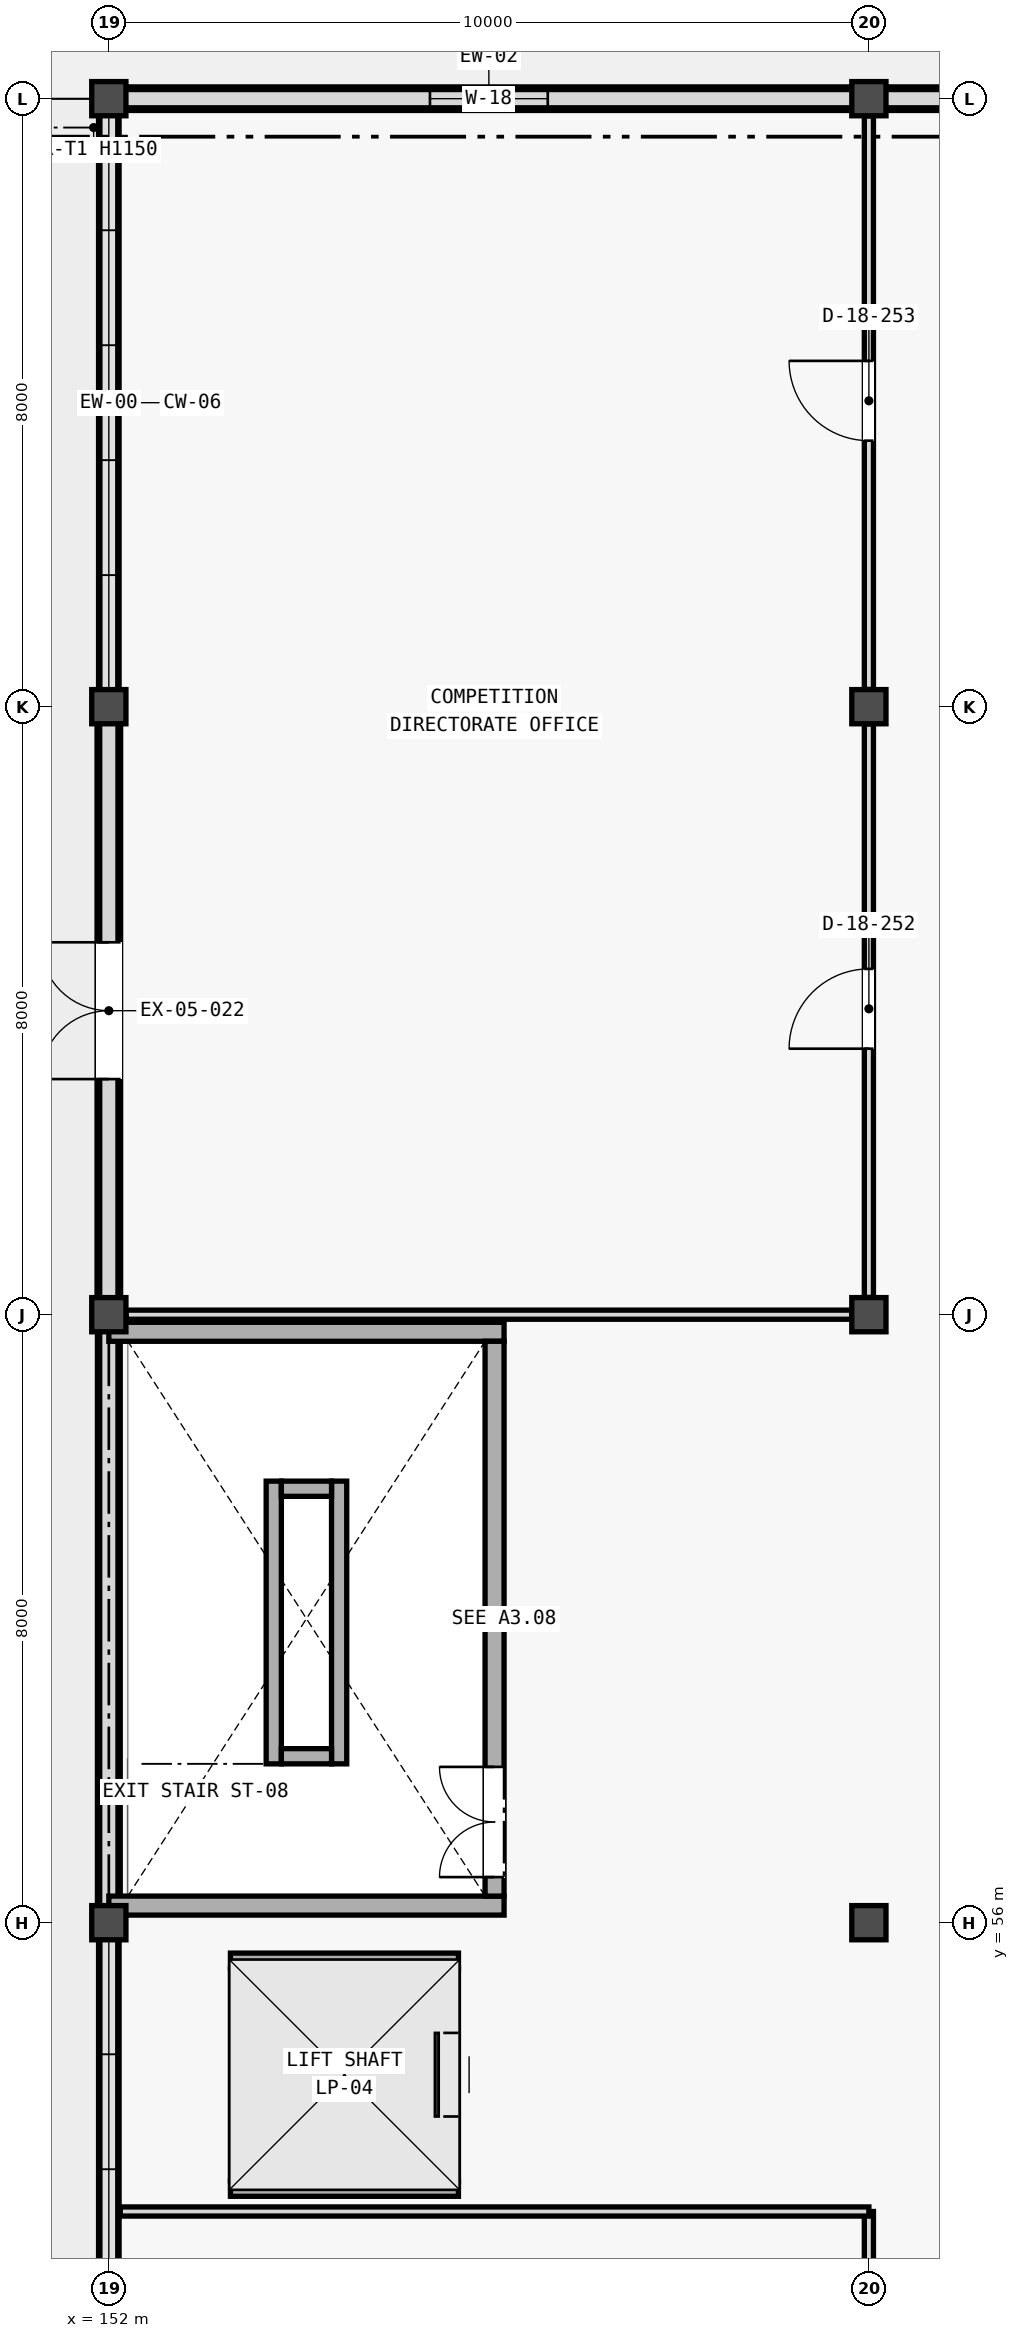
"""IFC4 building model, lengths in metres.
Left out: names, types, materials, properties, quantities, classifications, styles, units other than length and angle.
Written with IfcOpenShell. Run it as: python <this file> out.ifc"""

import sys

from ifc_helpers import new_model, si_unit, direction, frame, frame_2d, origin, origin_2d, place, context, subcontext, project, spatial, rectangle, extrude, element, fill, save


model = new_model("IFC4")
c1 = context("Model", 3, precision=1e-05, world=origin(), true_north=direction((0.0, 1.0)))
c2 = subcontext(c1, "Body", "Model", "MODEL_VIEW")
j1 = project(units=[si_unit("LENGTHUNIT", "METRE"), si_unit("PLANEANGLEUNIT", "RADIAN")], contexts=[c1])
p1 = place(None, origin())
s1 = spatial("IfcSite", under=j1, at=p1, CompositionType="ELEMENT")
p2 = place(p1, origin())
s2 = spatial("IfcBuilding", under=s1, at=p2, CompositionType="ELEMENT")
p3 = place(p2, frame((0.0, 0.0, 18.6)))
s3 = spatial("IfcBuildingStorey", under=s2, at=p3, CompositionType="ELEMENT", Elevation=18.6)
for number, where, z_axis, x_axis in (
    (1, (152.0, 56.0, 0.0), (0.0, 0.0, 1.0), (1.0, 0.0, 0.0)),
    (2, (162.0, 56.0, 0.0), (0.0, 0.0, 1.0), (1.0, 0.0, 0.0)),
    (3, (152.0, 64.0, 0.0), (0.0, 0.0, 1.0), (1.0, 0.0, 0.0)),
    (4, (162.0, 64.0, 0.0), (0.0, 0.0, 1.0), (1.0, 0.0, 0.0)),
    (5, (152.0, 72.0, 0.0), (0.0, 0.0, 1.0), (1.0, 0.0, 0.0)),
    (6, (162.0, 72.0, 0.0), (0.0, 0.0, 1.0), (1.0, 0.0, 0.0)),
    (7, (152.0, 80.0, 0.0), (0.0, 0.0, 1.0), (1.0, 0.0, 0.0)),
    (8, (162.0, 80.0, 0.0), (0.0, 0.0, 1.0), (1.0, 0.0, 0.0)),
):
    element("IfcColumn", number, at=place(p3, frame(where, z_axis=z_axis, x_axis=x_axis)), inside=s3, PredefinedType="COLUMN", context=c2, shape_type="SweptSolid", body=[
        extrude(rectangle(XDim=0.45, YDim=0.45, at=origin_2d()), origin(), (0.0, 0.0, 1.0), 3.985),
    ])
p4 = place(p3, frame((152.0, 48.221, 0.0), z_axis=(0.0, 0.0, 1.0), x_axis=(0.0, 1.0, 0.0)))
e9 = element("IfcWall", 9, at=p4, inside=s3, PredefinedType="STANDARD", context=c2, shape_type="SweptSolid", body=[
    extrude(rectangle(XDim=7.558, YDim=0.27, at=frame_2d((3.779, 0.0))), origin(), (0.0, 0.0, 1.0), 0.8),
])
p5 = place(p3, frame((152.0, 56.221, 0.0), z_axis=(0.0, 0.0, 1.0), x_axis=(0.0, 1.0, 0.0)))
e10 = element("IfcWall", 10, at=p5, inside=s3, PredefinedType="SHEAR", context=c2, shape_type="SweptSolid", body=[
    extrude(rectangle(XDim=7.558, YDim=0.3, at=frame_2d((3.779, 0.0))), origin(), (0.0, 0.0, 1.0), 3.985),
])
p6 = place(p3, frame((152.0, 64.221, 0.0), z_axis=(0.0, 0.0, 1.0), x_axis=(0.0, 1.0, 0.0)))
e11 = element("IfcWall", 11, at=p6, inside=s3, PredefinedType="STANDARD", context=c2, shape_type="SweptSolid", body=[
    extrude(rectangle(XDim=7.558, YDim=0.31, at=frame_2d((3.779, 0.0))), origin(), (0.0, 0.0, 1.0), 3.365),
])
p7 = place(p6, frame((2.879, 0.0, 0.0)))
e12 = element("IfcOpeningElement", 12, at=p7, cuts=e11, PredefinedType="OPENING", context=c2, shape_type="SweptSolid", body=[
    extrude(rectangle(XDim=1.8, YDim=2.3, at=frame_2d((0.9, 1.15))), frame((0.0, 0.165, 0.0), z_axis=(0.0, -1.0, 0.0), x_axis=(1.0, 0.0, 0.0)), (0.0, 0.0, 1.0), 0.33),
])
p8 = place(p3, frame((152.0, 72.221, 0.0), z_axis=(0.0, 0.0, 1.0), x_axis=(0.0, 1.0, 0.0)))
e13 = element("IfcWall", 13, at=p8, inside=s3, PredefinedType="STANDARD", context=c2, shape_type="SweptSolid", body=[
    extrude(rectangle(XDim=7.558, YDim=0.27, at=frame_2d((3.779, 0.0))), origin(), (0.0, 0.0, 1.0), 0.8),
])
p9 = place(p3, frame((152.221, 80.0, 0.0), z_axis=(0.0, 0.0, 1.0), x_axis=(1.0, 0.0, 0.0)))
e14 = element("IfcWall", 14, at=p9, inside=s3, PredefinedType="STANDARD", context=c2, shape_type="SweptSolid", body=[
    extrude(rectangle(XDim=9.558, YDim=0.31, at=frame_2d((4.779, 0.0))), origin(), (0.0, 0.0, 1.0), 3.4),
])
p10 = place(p9, frame((4.004, 0.0, 0.95)))
e15 = element("IfcOpeningElement", 15, at=p10, cuts=e14, PredefinedType="OPENING", context=c2, shape_type="SweptSolid", body=[
    extrude(rectangle(XDim=1.55, YDim=1.95, at=frame_2d((0.775, 0.975))), frame((0.0, 0.165, 0.0), z_axis=(0.0, -1.0, 0.0), x_axis=(1.0, 0.0, 0.0)), (0.0, 0.0, 1.0), 0.33),
])
p11 = place(p3, frame((162.221, 80.0, 0.0), z_axis=(0.0, 0.0, 1.0), x_axis=(1.0, 0.0, 0.0)))
e16 = element("IfcWall", 16, at=p11, inside=s3, PredefinedType="STANDARD", context=c2, shape_type="SweptSolid", body=[
    extrude(rectangle(XDim=11.558, YDim=0.31, at=frame_2d((5.779, 0.0))), origin(), (0.0, 0.0, 1.0), 3.4),
])
p12 = place(p11, frame((4.954, 0.0, 0.95)))
e17 = element("IfcOpeningElement", 17, at=p12, cuts=e16, PredefinedType="OPENING", context=c2, shape_type="SweptSolid", body=[
    extrude(rectangle(XDim=1.65, YDim=1.7, at=frame_2d((0.825, 0.85))), frame((0.0, 0.165, 0.0), z_axis=(0.0, -1.0, 0.0), x_axis=(1.0, 0.0, 0.0)), (0.0, 0.0, 1.0), 0.33),
])
p13 = place(p3, frame((152.0, 80.0, 4.2), z_axis=(0.0, 0.0, 1.0), x_axis=(1.0, 0.0, 0.0)))
e18 = element("IfcWall", 18, at=p13, inside=s3, PredefinedType="PARAPET", context=c2, shape_type="SweptSolid", body=[
    extrude(rectangle(XDim=32.0, YDim=0.24, at=frame_2d((16.0, 0.0))), origin(), (0.0, 0.0, 1.0), 1.1),
])
p14 = place(p3, frame((152.0, 24.12, 4.2), z_axis=(0.0, 0.0, 1.0), x_axis=(0.0, 1.0, 0.0)))
e19 = element("IfcWall", 19, at=p14, inside=s3, PredefinedType="PARAPET", context=c2, shape_type="SweptSolid", body=[
    extrude(rectangle(XDim=55.76, YDim=0.24, at=frame_2d((27.88, 0.0))), origin(), (0.0, 0.0, 1.0), 1.1),
])
for number, where, z_axis, x_axis in (
    (20, (152.0, 56.225, 0.0), (0.0, 0.0, 1.0), (1.0, 0.0, 0.0)),
    (21, (152.0, 63.775, 0.0), (0.0, 0.0, 1.0), (1.0, 0.0, 0.0)),
):
    element("IfcWall", number, at=place(p3, frame(where, z_axis=z_axis, x_axis=x_axis)), inside=s3, PredefinedType="SHEAR", context=c2, shape_type="SweptSolid", body=[
        extrude(rectangle(XDim=5.2, YDim=0.25, at=frame_2d((2.6, 0.0))), origin(), (0.0, 0.0, 1.0), 3.985),
    ])
p15 = place(p3, frame((157.075, 56.35, 0.0), z_axis=(0.0, 0.0, 1.0), x_axis=(0.0, 1.0, 0.0)))
e22 = element("IfcWall", 22, at=p15, inside=s3, PredefinedType="SHEAR", context=c2, shape_type="SweptSolid", body=[
    extrude(rectangle(XDim=7.3, YDim=0.25, at=frame_2d((3.65, 0.0))), origin(), (0.0, 0.0, 1.0), 3.985),
])
p16 = place(p15, frame((0.25, 0.0, 0.0)))
e23 = element("IfcOpeningElement", 23, at=p16, cuts=e22, PredefinedType="OPENING", context=c2, shape_type="SweptSolid", body=[
    extrude(rectangle(XDim=1.45, YDim=2.2, at=frame_2d((0.725, 1.1))), frame((0.0, 0.135, 0.0), z_axis=(0.0, -1.0, 0.0), x_axis=(1.0, 0.0, 0.0)), (0.0, 0.0, 1.0), 0.27),
])
for number, where, z_axis, x_axis in (
    (24, (154.17, 58.09, 0.0), (0.0, 0.0, 1.0), (0.0, 1.0, 0.0)),
    (25, (155.03, 58.09, 0.0), (0.0, 0.0, 1.0), (0.0, 1.0, 0.0)),
):
    element("IfcWall", number, at=place(p3, frame(where, z_axis=z_axis, x_axis=x_axis)), inside=s3, PredefinedType="SHEAR", context=c2, shape_type="SweptSolid", body=[
        extrude(rectangle(XDim=3.72, YDim=0.2, at=frame_2d((1.86, 0.0))), origin(), (0.0, 0.0, 1.0), 3.985),
    ])
for number, where, z_axis, x_axis in (
    (26, (154.27, 58.19, 0.0), (0.0, 0.0, 1.0), (1.0, 0.0, 0.0)),
    (27, (154.27, 61.71, 0.0), (0.0, 0.0, 1.0), (1.0, 0.0, 0.0)),
):
    element("IfcWall", number, at=place(p3, frame(where, z_axis=z_axis, x_axis=x_axis)), inside=s3, PredefinedType="SHEAR", context=c2, shape_type="SweptSolid", body=[
        extrude(rectangle(XDim=0.66, YDim=0.2, at=frame_2d((0.33, 0.0))), origin(), (0.0, 0.0, 1.0), 3.985),
    ])
for number, where, z_axis, x_axis in (
    (28, (153.6, 52.5, 0.0), (0.0, 0.0, 1.0), (1.0, 0.0, 0.0)),
    (29, (153.6, 55.5, 0.0), (0.0, 0.0, 1.0), (1.0, 0.0, 0.0)),
):
    element("IfcWall", number, at=place(p3, frame(where, z_axis=z_axis, x_axis=x_axis)), inside=s3, PredefinedType="SHEAR", context=c2, shape_type="SweptSolid", body=[
        extrude(rectangle(XDim=3.0, YDim=0.2, at=frame_2d((1.5, 0.0))), origin(), (0.0, 0.0, 1.0), 3.985),
    ])
p17 = place(p3, frame((153.7, 52.6, 0.0), z_axis=(0.0, 0.0, 1.0), x_axis=(0.0, 1.0, 0.0)))
e30 = element("IfcWall", 30, at=p17, inside=s3, PredefinedType="SHEAR", context=c2, shape_type="SweptSolid", body=[
    extrude(rectangle(XDim=2.8, YDim=0.2, at=frame_2d((1.4, 0.0))), origin(), (0.0, 0.0, 1.0), 3.985),
])
p18 = place(p3, frame((156.5, 52.6, 0.0), z_axis=(0.0, 0.0, 1.0), x_axis=(0.0, 1.0, 0.0)))
e31 = element("IfcWall", 31, at=p18, inside=s3, PredefinedType="SHEAR", context=c2, shape_type="SweptSolid", body=[
    extrude(rectangle(XDim=2.8, YDim=0.2, at=frame_2d((1.4, 0.0))), origin(), (0.0, 0.0, 1.0), 3.985),
])
p19 = place(p18, frame((0.85, 0.0, 0.0)))
e32 = element("IfcOpeningElement", 32, at=p19, cuts=e31, PredefinedType="OPENING", context=c2, shape_type="SweptSolid", body=[
    extrude(rectangle(XDim=1.1, YDim=2.2, at=frame_2d((0.55, 1.1))), frame((0.0, 0.11, 0.0), z_axis=(0.0, -1.0, 0.0), x_axis=(1.0, 0.0, 0.0)), (0.0, 0.0, 1.0), 0.22),
])
p20 = place(p3, frame((162.0, 48.227, 0.0), z_axis=(0.0, 0.0, 1.0), x_axis=(0.0, 1.0, 0.0)))
e33 = element("IfcWall", 33, at=p20, inside=s3, PredefinedType="PARTITIONING", context=c2, shape_type="SweptSolid", body=[
    extrude(rectangle(XDim=3.973, YDim=0.12, at=frame_2d((1.986, 0.0))), origin(), (0.0, 0.0, 1.0), 3.365),
])
p21 = place(p3, frame((162.0, 64.227, 0.0), z_axis=(0.0, 0.0, 1.0), x_axis=(0.0, 1.0, 0.0)))
e34 = element("IfcWall", 34, at=p21, inside=s3, PredefinedType="PARTITIONING", context=c2, shape_type="SweptSolid", body=[
    extrude(rectangle(XDim=7.546, YDim=0.12, at=frame_2d((3.773, 0.0))), origin(), (0.0, 0.0, 1.0), 3.365),
])
p22 = place(p21, frame((3.273, 0.0, 0.0)))
e35 = element("IfcOpeningElement", 35, at=p22, cuts=e34, PredefinedType="OPENING", context=c2, shape_type="SweptSolid", body=[
    extrude(rectangle(XDim=1.05, YDim=2.2, at=frame_2d((0.525, 1.1))), frame((0.0, 0.07, 0.0), z_axis=(0.0, -1.0, 0.0), x_axis=(1.0, 0.0, 0.0)), (0.0, 0.0, 1.0), 0.14),
])
p23 = place(p3, frame((162.0, 72.227, 0.0), z_axis=(0.0, 0.0, 1.0), x_axis=(0.0, 1.0, 0.0)))
e36 = element("IfcWall", 36, at=p23, inside=s3, PredefinedType="PARTITIONING", context=c2, shape_type="SweptSolid", body=[
    extrude(rectangle(XDim=7.546, YDim=0.12, at=frame_2d((3.773, 0.0))), origin(), (0.0, 0.0, 1.0), 3.365),
])
p24 = place(p23, frame((3.273, 0.0, 0.0)))
e37 = element("IfcOpeningElement", 37, at=p24, cuts=e36, PredefinedType="OPENING", context=c2, shape_type="SweptSolid", body=[
    extrude(rectangle(XDim=1.05, YDim=2.2, at=frame_2d((0.525, 1.1))), frame((0.0, 0.07, 0.0), z_axis=(0.0, -1.0, 0.0), x_axis=(1.0, 0.0, 0.0)), (0.0, 0.0, 1.0), 0.14),
])
p25 = place(p3, frame((152.15, 52.2, 0.0), z_axis=(0.0, 0.0, 1.0), x_axis=(1.0, 0.0, 0.0)))
e38 = element("IfcWall", 38, at=p25, inside=s3, PredefinedType="PARTITIONING", context=c2, shape_type="SweptSolid", body=[
    extrude(rectangle(XDim=9.85, YDim=0.12, at=frame_2d((4.925, 0.0))), origin(), (0.0, 0.0, 1.0), 3.365),
])
p26 = place(p3, frame((152.227, 64.0, 0.0), z_axis=(0.0, 0.0, 1.0), x_axis=(1.0, 0.0, 0.0)))
e39 = element("IfcWall", 39, at=p26, inside=s3, PredefinedType="PARTITIONING", context=c2, shape_type="SweptSolid", body=[
    extrude(rectangle(XDim=9.546, YDim=0.12, at=frame_2d((4.773, 0.0))), origin(), (0.0, 0.0, 1.0), 3.515),
])
p27 = place(p7, origin())
e40 = element("IfcDoor", 40, at=p27, inside=s3, OperationType="DOUBLE_DOOR_SINGLE_SWING", PredefinedType="DOOR", context=c2, shape_type="SweptSolid", body=[
    extrude(rectangle(XDim=1.8, YDim=2.3, at=frame_2d((0.9, 1.15))), frame((0.0, 0.025, 0.0), z_axis=(0.0, -1.0, 0.0), x_axis=(1.0, 0.0, 0.0)), (0.0, 0.0, 1.0), 0.05),
])
fill(e12, e40)
p28 = place(p10, origin())
e41 = element("IfcWindow", 41, at=p28, inside=s3, PartitioningType="SINGLE_PANEL", PredefinedType="WINDOW", context=c2, shape_type="SweptSolid", body=[
    extrude(rectangle(XDim=1.55, YDim=1.95, at=frame_2d((0.775, 0.975))), frame((0.0, 0.03, 0.0), z_axis=(0.0, -1.0, 0.0), x_axis=(1.0, 0.0, 0.0)), (0.0, 0.0, 1.0), 0.06),
])
fill(e15, e41)
p29 = place(p16, origin())
e42 = element("IfcDoor", 42, at=p29, inside=s3, OperationType="DOUBLE_DOOR_SINGLE_SWING", PredefinedType="DOOR", context=c2, shape_type="SweptSolid", body=[
    extrude(rectangle(XDim=1.45, YDim=2.2, at=frame_2d((0.725, 1.1))), frame((0.0, 0.025, 0.0), z_axis=(0.0, -1.0, 0.0), x_axis=(1.0, 0.0, 0.0)), (0.0, 0.0, 1.0), 0.05),
])
fill(e23, e42)
p30 = place(p19, origin())
e43 = element("IfcDoor", 43, at=p30, inside=s3, OperationType="SLIDING_TO_LEFT", PredefinedType="DOOR", context=c2, shape_type="SweptSolid", body=[
    extrude(rectangle(XDim=1.1, YDim=2.2, at=frame_2d((0.55, 1.1))), frame((0.0, 0.025, 0.0), z_axis=(0.0, -1.0, 0.0), x_axis=(1.0, 0.0, 0.0)), (0.0, 0.0, 1.0), 0.05),
])
fill(e32, e43)
p31 = place(p22, origin())
e44 = element("IfcDoor", 44, at=p31, inside=s3, OperationType="SINGLE_SWING_LEFT", PredefinedType="DOOR", context=c2, shape_type="SweptSolid", body=[
    extrude(rectangle(XDim=1.05, YDim=2.2, at=frame_2d((0.525, 1.1))), frame((0.0, 0.025, 0.0), z_axis=(0.0, -1.0, 0.0), x_axis=(1.0, 0.0, 0.0)), (0.0, 0.0, 1.0), 0.05),
])
fill(e35, e44)
p32 = place(p24, origin())
e45 = element("IfcDoor", 45, at=p32, inside=s3, OperationType="SINGLE_SWING_RIGHT", PredefinedType="DOOR", context=c2, shape_type="SweptSolid", body=[
    extrude(rectangle(XDim=1.05, YDim=2.2, at=frame_2d((0.525, 1.1))), frame((0.0, 0.025, 0.0), z_axis=(0.0, -1.0, 0.0), x_axis=(1.0, 0.0, 0.0)), (0.0, 0.0, 1.0), 0.05),
])
fill(e37, e45)
save(model, sys.argv[1])
